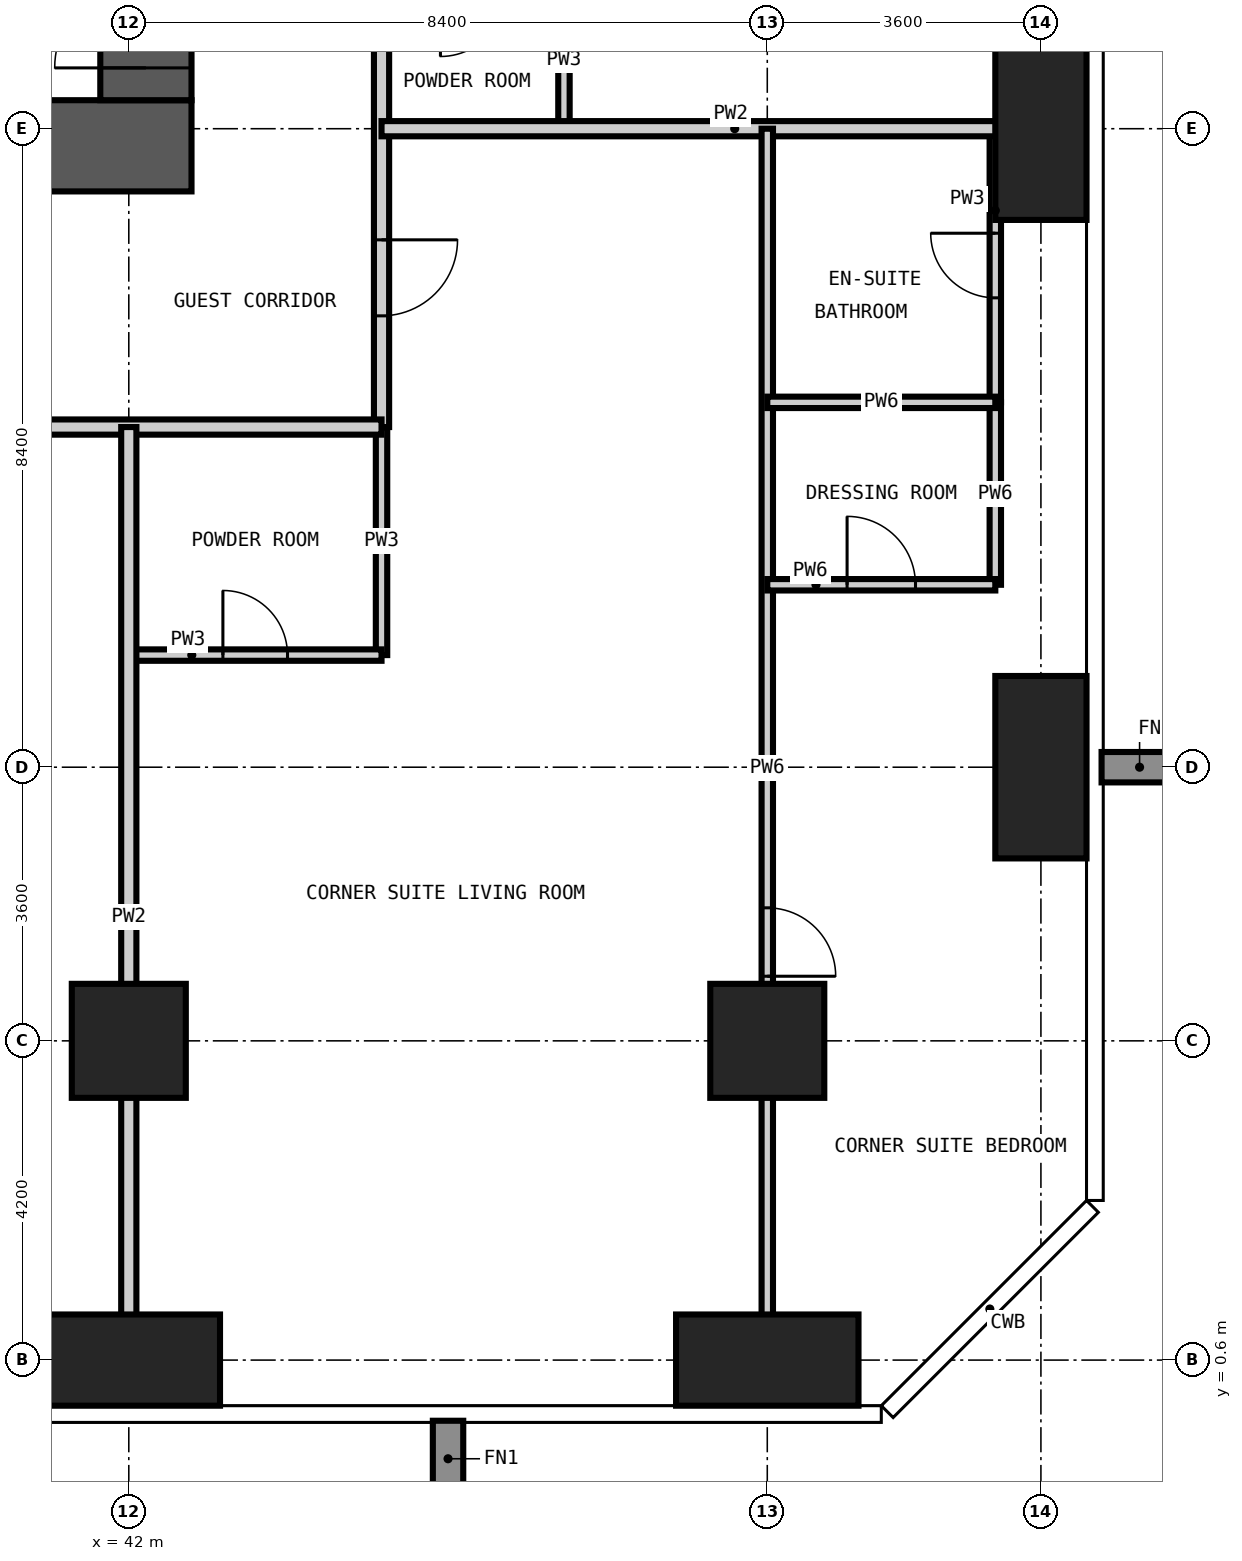
"""IFC4 building model, lengths in metres.
Left out: names, types, materials, properties, quantities, classifications, styles, units other than length and angle.
Written with IfcOpenShell. Run it as: python <this file> out.ifc"""

import sys

from ifc_helpers import new_model, si_unit, direction, frame, frame_2d, origin, origin_2d, place, context, subcontext, project, spatial, rectangle, extrude, element, fill, save


model = new_model("IFC4")
c1 = context("Model", 3, precision=1e-05, world=origin(), true_north=direction((0.0, 1.0)))
c2 = subcontext(c1, "Body", "Model", "MODEL_VIEW")
j1 = project(units=[si_unit("LENGTHUNIT", "METRE"), si_unit("PLANEANGLEUNIT", "RADIAN")], contexts=[c1])
p1 = place(None, origin())
s1 = spatial("IfcSite", under=j1, at=p1, CompositionType="ELEMENT")
p2 = place(p1, origin())
s2 = spatial("IfcBuilding", under=s1, at=p2, CompositionType="ELEMENT")
p3 = place(p2, frame((0.0, 0.0, 111.6)))
s3 = spatial("IfcBuildingStorey", under=s2, at=p3, CompositionType="ELEMENT", Elevation=111.6)
p4 = place(p3, frame((42.0, 0.6, -0.35), z_axis=(0.0, 0.0, 1.0), x_axis=(1.0, 0.0, 0.0)))
e1 = element("IfcColumn", 1, at=p4, inside=s3, PredefinedType="COLUMN", context=c2, shape_type="SweptSolid", body=[
    extrude(rectangle(XDim=2.4, YDim=1.2, at=origin_2d()), origin(), (0.0, 0.0, 1.0), 3.6),
])
p5 = place(p3, frame((42.0, 4.8, -0.35), z_axis=(0.0, 0.0, 1.0), x_axis=(1.0, 0.0, 0.0)))
e2 = element("IfcColumn", 2, at=p5, inside=s3, PredefinedType="COLUMN", context=c2, shape_type="SweptSolid", body=[
    extrude(rectangle(XDim=1.5, YDim=1.5, at=origin_2d()), origin(), (0.0, 0.0, 1.0), 3.6),
])
p6 = place(p3, frame((50.4, 0.6, -0.35), z_axis=(0.0, 0.0, 1.0), x_axis=(1.0, 0.0, 0.0)))
e3 = element("IfcColumn", 3, at=p6, inside=s3, PredefinedType="COLUMN", context=c2, shape_type="SweptSolid", body=[
    extrude(rectangle(XDim=2.4, YDim=1.2, at=origin_2d()), origin(), (0.0, 0.0, 1.0), 3.6),
])
p7 = place(p3, frame((50.4, 4.8, -0.35), z_axis=(0.0, 0.0, 1.0), x_axis=(1.0, 0.0, 0.0)))
e4 = element("IfcColumn", 4, at=p7, inside=s3, PredefinedType="COLUMN", context=c2, shape_type="SweptSolid", body=[
    extrude(rectangle(XDim=1.5, YDim=1.5, at=origin_2d()), origin(), (0.0, 0.0, 1.0), 3.6),
])
for number, where, z_axis, x_axis in (
    (5, (54.0, 8.4, -0.35), (0.0, 0.0, 1.0), (1.0, 0.0, 0.0)),
    (6, (54.0, 16.8, -0.35), (0.0, 0.0, 1.0), (1.0, 0.0, 0.0)),
):
    element("IfcColumn", number, at=place(p3, frame(where, z_axis=z_axis, x_axis=x_axis)), inside=s3, PredefinedType="COLUMN", context=c2, shape_type="SweptSolid", body=[
        extrude(rectangle(XDim=1.2, YDim=2.4, at=origin_2d()), origin(), (0.0, 0.0, 1.0), 3.6),
    ])
p8 = place(p3, frame((15.975, 16.575, -0.35), z_axis=(0.0, 0.0, 1.0), x_axis=(1.0, 0.0, 0.0)))
e7 = element("IfcWall", 7, at=p8, inside=s3, PredefinedType="SHEAR", context=c2, shape_type="SweptSolid", body=[
    extrude(rectangle(XDim=26.85, YDim=1.2, at=frame_2d((13.425, 0.0))), origin(), (0.0, 0.0, 1.0), 3.6),
])
p9 = place(p8, frame((12.925, 0.0, 0.35)))
e8 = element("IfcOpeningElement", 8, at=p9, cuts=e7, PredefinedType="OPENING", context=c2, shape_type="SweptSolid", body=[
    extrude(rectangle(XDim=1.0, YDim=2.1, at=frame_2d((0.5, 1.05))), frame((0.0, 0.61, 0.0), z_axis=(0.0, -1.0, 0.0), x_axis=(1.0, 0.0, 0.0)), (0.0, 0.0, 1.0), 1.22),
])
p10 = place(p8, frame((19.225, 0.0, 0.35)))
e9 = element("IfcOpeningElement", 9, at=p10, cuts=e7, PredefinedType="OPENING", context=c2, shape_type="SweptSolid", body=[
    extrude(rectangle(XDim=1.0, YDim=2.1, at=frame_2d((0.5, 1.05))), frame((0.0, 0.61, 0.0), z_axis=(0.0, -1.0, 0.0), x_axis=(1.0, 0.0, 0.0)), (0.0, 0.0, 1.0), 1.22),
])
p11 = place(p3, frame((42.225, 17.175, -0.35), z_axis=(0.0, 0.0, 1.0), x_axis=(0.0, 1.0, 0.0)))
e10 = element("IfcWall", 10, at=p11, inside=s3, PredefinedType="SHEAR", context=c2, shape_type="SweptSolid", body=[
    extrude(rectangle(XDim=24.45, YDim=1.2, at=frame_2d((12.225, 0.0))), origin(), (0.0, 0.0, 1.0), 3.6),
])
p12 = place(p11, frame((0.425, 0.0, 0.35)))
e11 = element("IfcOpeningElement", 11, at=p12, cuts=e10, PredefinedType="OPENING", context=c2, shape_type="SweptSolid", body=[
    extrude(rectangle(XDim=1.2, YDim=2.2, at=frame_2d((0.6, 1.1))), frame((0.0, 0.61, 0.0), z_axis=(0.0, -1.0, 0.0), x_axis=(1.0, 0.0, 0.0)), (0.0, 0.0, 1.0), 1.22),
])
p13 = place(p11, frame((11.325, 0.0, 0.35)))
e12 = element("IfcOpeningElement", 12, at=p13, cuts=e10, PredefinedType="OPENING", context=c2, shape_type="SweptSolid", body=[
    extrude(rectangle(XDim=1.8, YDim=2.2, at=frame_2d((0.9, 1.1))), frame((0.0, 0.61, 0.0), z_axis=(0.0, -1.0, 0.0), x_axis=(1.0, 0.0, 0.0)), (0.0, 0.0, 1.0), 1.22),
])
p14 = place(p11, frame((20.125, 0.0, 0.35)))
e13 = element("IfcOpeningElement", 13, at=p14, cuts=e10, PredefinedType="OPENING", context=c2, shape_type="SweptSolid", body=[
    extrude(rectangle(XDim=1.0, YDim=2.1, at=frame_2d((0.5, 1.05))), frame((0.0, 0.61, 0.0), z_axis=(0.0, -1.0, 0.0), x_axis=(1.0, 0.0, 0.0)), (0.0, 0.0, 1.0), 1.22),
])
p15 = place(p3, frame((45.325, 9.875, 0.0), z_axis=(0.0, 0.0, 1.0), x_axis=(0.0, 1.0, 0.0)))
e14 = element("IfcWall", 14, at=p15, inside=s3, PredefinedType="PARTITIONING", context=c2, shape_type="SweptSolid", body=[
    extrude(rectangle(XDim=3.0, YDim=0.15, at=frame_2d((1.5, 0.0))), origin(), (0.0, 0.0, 1.0), 3.25),
])
p16 = place(p3, frame((47.725, 16.8, 0.0), z_axis=(0.0, 0.0, 1.0), x_axis=(0.0, 1.0, 0.0)))
e15 = element("IfcWall", 15, at=p16, inside=s3, PredefinedType="PARTITIONING", context=c2, shape_type="SweptSolid", body=[
    extrude(rectangle(XDim=1.8, YDim=0.15, at=frame_2d((0.9, 0.0))), origin(), (0.0, 0.0, 1.0), 3.25),
])
p17 = place(p3, frame((53.4, 13.2, 0.0), z_axis=(0.0, 0.0, 1.0), x_axis=(0.0, 1.0, 0.0)))
e16 = element("IfcWall", 16, at=p17, inside=s3, PredefinedType="PARTITIONING", context=c2, shape_type="SweptSolid", body=[
    extrude(rectangle(XDim=3.6, YDim=0.15, at=frame_2d((1.8, 0.0))), origin(), (0.0, 0.0, 1.0), 3.25),
])
p18 = place(p17, frame((1.375, 0.0, 0.0)))
e17 = element("IfcOpeningElement", 17, at=p18, cuts=e16, PredefinedType="OPENING", context=c2, shape_type="SweptSolid", body=[
    extrude(rectangle(XDim=0.85, YDim=2.1, at=frame_2d((0.425, 1.05))), frame((0.0, 0.085, 0.0), z_axis=(0.0, -1.0, 0.0), x_axis=(1.0, 0.0, 0.0)), (0.0, 0.0, 1.0), 0.17),
])
p19 = place(p3, frame((42.0, 9.875, 0.0), z_axis=(0.0, 0.0, 1.0), x_axis=(1.0, 0.0, 0.0)))
e18 = element("IfcWall", 18, at=p19, inside=s3, PredefinedType="PARTITIONING", context=c2, shape_type="SweptSolid", body=[
    extrude(rectangle(XDim=3.325, YDim=0.15, at=frame_2d((1.663, 0.0))), origin(), (0.0, 0.0, 1.0), 3.25),
])
p20 = place(p19, frame((1.238, 0.0, 0.0)))
e19 = element("IfcOpeningElement", 19, at=p20, cuts=e18, PredefinedType="OPENING", context=c2, shape_type="SweptSolid", body=[
    extrude(rectangle(XDim=0.85, YDim=2.1, at=frame_2d((0.425, 1.05))), frame((0.0, 0.085, 0.0), z_axis=(0.0, -1.0, 0.0), x_axis=(1.0, 0.0, 0.0)), (0.0, 0.0, 1.0), 0.17),
])
p21 = place(p3, frame((45.325, 44.725, 0.0), z_axis=(0.0, 0.0, 1.0), x_axis=(0.0, -1.0, 0.0)))
e20 = element("IfcWall", 20, at=p21, inside=s3, PredefinedType="PARTITIONING", context=c2, shape_type="SweptSolid", body=[
    extrude(rectangle(XDim=31.85, YDim=0.2, at=frame_2d((15.925, 0.0))), origin(), (0.0, 0.0, 1.0), 3.25),
])
p22 = place(p21, frame((24.425, 0.0, 0.0)))
e21 = element("IfcOpeningElement", 21, at=p22, cuts=e20, PredefinedType="OPENING", context=c2, shape_type="SweptSolid", body=[
    extrude(rectangle(XDim=1.0, YDim=2.2, at=frame_2d((0.5, 1.1))), frame((0.0, 0.11, 0.0), z_axis=(0.0, -1.0, 0.0), x_axis=(1.0, 0.0, 0.0)), (0.0, 0.0, 1.0), 0.22),
])
p23 = place(p21, frame((16.025, 0.0, 0.0)))
e22 = element("IfcOpeningElement", 22, at=p23, cuts=e20, PredefinedType="OPENING", context=c2, shape_type="SweptSolid", body=[
    extrude(rectangle(XDim=1.0, YDim=2.2, at=frame_2d((0.5, 1.1))), frame((0.0, 0.11, 0.0), z_axis=(0.0, -1.0, 0.0), x_axis=(1.0, 0.0, 0.0)), (0.0, 0.0, 1.0), 0.22),
])
p24 = place(p21, frame((7.625, 0.0, 0.0)))
e23 = element("IfcOpeningElement", 23, at=p24, cuts=e20, PredefinedType="OPENING", context=c2, shape_type="SweptSolid", body=[
    extrude(rectangle(XDim=1.0, YDim=2.2, at=frame_2d((0.5, 1.1))), frame((0.0, 0.11, 0.0), z_axis=(0.0, -1.0, 0.0), x_axis=(1.0, 0.0, 0.0)), (0.0, 0.0, 1.0), 0.22),
])
p25 = place(p21, frame((29.387, 0.0, 0.0)))
e24 = element("IfcOpeningElement", 24, at=p25, cuts=e20, PredefinedType="OPENING", context=c2, shape_type="SweptSolid", body=[
    extrude(rectangle(XDim=1.0, YDim=2.2, at=frame_2d((0.5, 1.1))), frame((0.0, 0.11, 0.0), z_axis=(0.0, -1.0, 0.0), x_axis=(1.0, 0.0, 0.0)), (0.0, 0.0, 1.0), 0.22),
])
p26 = place(p21, frame((0.863, 0.0, 0.0)))
e25 = element("IfcOpeningElement", 25, at=p26, cuts=e20, PredefinedType="OPENING", context=c2, shape_type="SweptSolid", body=[
    extrude(rectangle(XDim=1.0, YDim=2.2, at=frame_2d((0.5, 1.1))), frame((0.0, 0.11, 0.0), z_axis=(0.0, -1.0, 0.0), x_axis=(1.0, 0.0, 0.0)), (0.0, 0.0, 1.0), 0.22),
])
p27 = place(p3, frame((45.325, 12.875, 0.0), z_axis=(0.0, 0.0, 1.0), x_axis=(-1.0, 0.0, 0.0)))
e26 = element("IfcWall", 26, at=p27, inside=s3, PredefinedType="PARTITIONING", context=c2, shape_type="SweptSolid", body=[
    extrude(rectangle(XDim=32.725, YDim=0.2, at=frame_2d((16.362, 0.0))), origin(), (0.0, 0.0, 1.0), 3.25),
])
p28 = place(p27, frame((22.625, 0.0, 0.0)))
e27 = element("IfcOpeningElement", 27, at=p28, cuts=e26, PredefinedType="OPENING", context=c2, shape_type="SweptSolid", body=[
    extrude(rectangle(XDim=1.0, YDim=2.2, at=frame_2d((0.5, 1.1))), frame((0.0, 0.11, 0.0), z_axis=(0.0, -1.0, 0.0), x_axis=(1.0, 0.0, 0.0)), (0.0, 0.0, 1.0), 0.22),
])
p29 = place(p27, frame((14.225, 0.0, 0.0)))
e28 = element("IfcOpeningElement", 28, at=p29, cuts=e26, PredefinedType="OPENING", context=c2, shape_type="SweptSolid", body=[
    extrude(rectangle(XDim=1.0, YDim=2.2, at=frame_2d((0.5, 1.1))), frame((0.0, 0.11, 0.0), z_axis=(0.0, -1.0, 0.0), x_axis=(1.0, 0.0, 0.0)), (0.0, 0.0, 1.0), 0.22),
])
p30 = place(p27, frame((5.825, 0.0, 0.0)))
e29 = element("IfcOpeningElement", 29, at=p30, cuts=e26, PredefinedType="OPENING", context=c2, shape_type="SweptSolid", body=[
    extrude(rectangle(XDim=1.0, YDim=2.2, at=frame_2d((0.5, 1.1))), frame((0.0, 0.11, 0.0), z_axis=(0.0, -1.0, 0.0), x_axis=(1.0, 0.0, 0.0)), (0.0, 0.0, 1.0), 0.22),
])
p31 = place(p3, frame((42.0, -0.018, 0.0), z_axis=(0.0, 0.0, 1.0), x_axis=(0.0, 1.0, 0.0)))
e30 = element("IfcWall", 30, at=p31, inside=s3, PredefinedType="PARTITIONING", context=c2, shape_type="SweptSolid", body=[
    extrude(rectangle(XDim=12.893, YDim=0.2, at=frame_2d((6.447, 0.0))), origin(), (0.0, 0.0, 1.0), 3.25),
])
p32 = place(p3, frame((45.325, 16.8, 0.0), z_axis=(0.0, 0.0, 1.0), x_axis=(1.0, 0.0, 0.0)))
e31 = element("IfcWall", 31, at=p32, inside=s3, PredefinedType="PARTITIONING", context=c2, shape_type="SweptSolid", body=[
    extrude(rectangle(XDim=9.293, YDim=0.2, at=frame_2d((4.646, 0.0))), origin(), (0.0, 0.0, 1.0), 3.25),
])
p33 = place(p3, frame((50.4, -0.018, 0.0), z_axis=(0.0, 0.0, 1.0), x_axis=(0.0, 1.0, 0.0)))
e32 = element("IfcWall", 32, at=p33, inside=s3, PredefinedType="PARTITIONING", context=c2, shape_type="SweptSolid", body=[
    extrude(rectangle(XDim=16.818, YDim=0.15, at=frame_2d((8.409, 0.0))), origin(), (0.0, 0.0, 1.0), 3.25),
])
p34 = place(p33, frame((5.668, 0.0, 0.0)))
e33 = element("IfcOpeningElement", 33, at=p34, cuts=e32, PredefinedType="OPENING", context=c2, shape_type="SweptSolid", body=[
    extrude(rectangle(XDim=0.9, YDim=2.1, at=frame_2d((0.45, 1.05))), frame((0.0, 0.085, 0.0), z_axis=(0.0, -1.0, 0.0), x_axis=(1.0, 0.0, 0.0)), (0.0, 0.0, 1.0), 0.17),
])
p35 = place(p3, frame((53.4, 10.8, 0.0), z_axis=(0.0, 0.0, 1.0), x_axis=(0.0, 1.0, 0.0)))
e34 = element("IfcWall", 34, at=p35, inside=s3, PredefinedType="PARTITIONING", context=c2, shape_type="SweptSolid", body=[
    extrude(rectangle(XDim=2.4, YDim=0.15, at=frame_2d((1.2, 0.0))), origin(), (0.0, 0.0, 1.0), 3.25),
])
p36 = place(p3, frame((50.4, 10.8, 0.0), z_axis=(0.0, 0.0, 1.0), x_axis=(1.0, 0.0, 0.0)))
e35 = element("IfcWall", 35, at=p36, inside=s3, PredefinedType="PARTITIONING", context=c2, shape_type="SweptSolid", body=[
    extrude(rectangle(XDim=3.0, YDim=0.15, at=frame_2d((1.5, 0.0))), origin(), (0.0, 0.0, 1.0), 3.25),
])
p37 = place(p36, frame((1.05, 0.0, 0.0)))
e36 = element("IfcOpeningElement", 36, at=p37, cuts=e35, PredefinedType="OPENING", context=c2, shape_type="SweptSolid", body=[
    extrude(rectangle(XDim=0.9, YDim=2.1, at=frame_2d((0.45, 1.05))), frame((0.0, 0.085, 0.0), z_axis=(0.0, -1.0, 0.0), x_axis=(1.0, 0.0, 0.0)), (0.0, 0.0, 1.0), 0.17),
])
p38 = place(p3, frame((50.4, 13.2, 0.0), z_axis=(0.0, 0.0, 1.0), x_axis=(1.0, 0.0, 0.0)))
e37 = element("IfcWall", 37, at=p38, inside=s3, PredefinedType="PARTITIONING", context=c2, shape_type="SweptSolid", body=[
    extrude(rectangle(XDim=3.0, YDim=0.15, at=frame_2d((1.5, 0.0))), origin(), (0.0, 0.0, 1.0), 3.25),
])
p39 = place(p12, origin())
e38 = element("IfcDoor", 38, at=p39, inside=s3, OperationType="SINGLE_SWING_LEFT", PredefinedType="DOOR", context=c2, shape_type="SweptSolid", body=[
    extrude(rectangle(XDim=1.2, YDim=2.2, at=frame_2d((0.6, 1.1))), frame((0.0, 0.025, 0.0), z_axis=(0.0, -1.0, 0.0), x_axis=(1.0, 0.0, 0.0)), (0.0, 0.0, 1.0), 0.05),
])
fill(e11, e38)
p40 = place(p25, origin())
e39 = element("IfcDoor", 39, at=p40, inside=s3, OperationType="SINGLE_SWING_LEFT", PredefinedType="DOOR", context=c2, shape_type="SweptSolid", body=[
    extrude(rectangle(XDim=1.0, YDim=2.2, at=frame_2d((0.5, 1.1))), frame((0.0, 0.025, 0.0), z_axis=(0.0, -1.0, 0.0), x_axis=(1.0, 0.0, 0.0)), (0.0, 0.0, 1.0), 0.05),
])
fill(e24, e39)
p41 = place(p20, origin())
e40 = element("IfcDoor", 40, at=p41, inside=s3, OperationType="SINGLE_SWING_LEFT", PredefinedType="DOOR", context=c2, shape_type="SweptSolid", body=[
    extrude(rectangle(XDim=0.85, YDim=2.1, at=frame_2d((0.425, 1.05))), frame((0.0, 0.025, 0.0), z_axis=(0.0, -1.0, 0.0), x_axis=(1.0, 0.0, 0.0)), (0.0, 0.0, 1.0), 0.05),
])
fill(e19, e40)
p42 = place(p34, frame((0.9, 0.0, 0.0), z_axis=(0.0, 0.0, 1.0), x_axis=(-1.0, 0.0, 0.0)))
e41 = element("IfcDoor", 41, at=p42, inside=s3, OperationType="SINGLE_SWING_RIGHT", PredefinedType="DOOR", context=c2, shape_type="SweptSolid", body=[
    extrude(rectangle(XDim=0.9, YDim=2.1, at=frame_2d((0.45, 1.05))), frame((0.0, 0.025, 0.0), z_axis=(0.0, -1.0, 0.0), x_axis=(1.0, 0.0, 0.0)), (0.0, 0.0, 1.0), 0.05),
])
fill(e33, e41)
p43 = place(p18, origin())
e42 = element("IfcDoor", 42, at=p43, inside=s3, OperationType="SINGLE_SWING_RIGHT", PredefinedType="DOOR", context=c2, shape_type="SweptSolid", body=[
    extrude(rectangle(XDim=0.85, YDim=2.1, at=frame_2d((0.425, 1.05))), frame((0.0, 0.025, 0.0), z_axis=(0.0, -1.0, 0.0), x_axis=(1.0, 0.0, 0.0)), (0.0, 0.0, 1.0), 0.05),
])
fill(e17, e42)
p44 = place(p37, origin())
e43 = element("IfcDoor", 43, at=p44, inside=s3, OperationType="SINGLE_SWING_LEFT", PredefinedType="DOOR", context=c2, shape_type="SweptSolid", body=[
    extrude(rectangle(XDim=0.9, YDim=2.1, at=frame_2d((0.45, 1.05))), frame((0.0, 0.025, 0.0), z_axis=(0.0, -1.0, 0.0), x_axis=(1.0, 0.0, 0.0)), (0.0, 0.0, 1.0), 0.05),
])
fill(e36, e43)
save(model, sys.argv[1])
